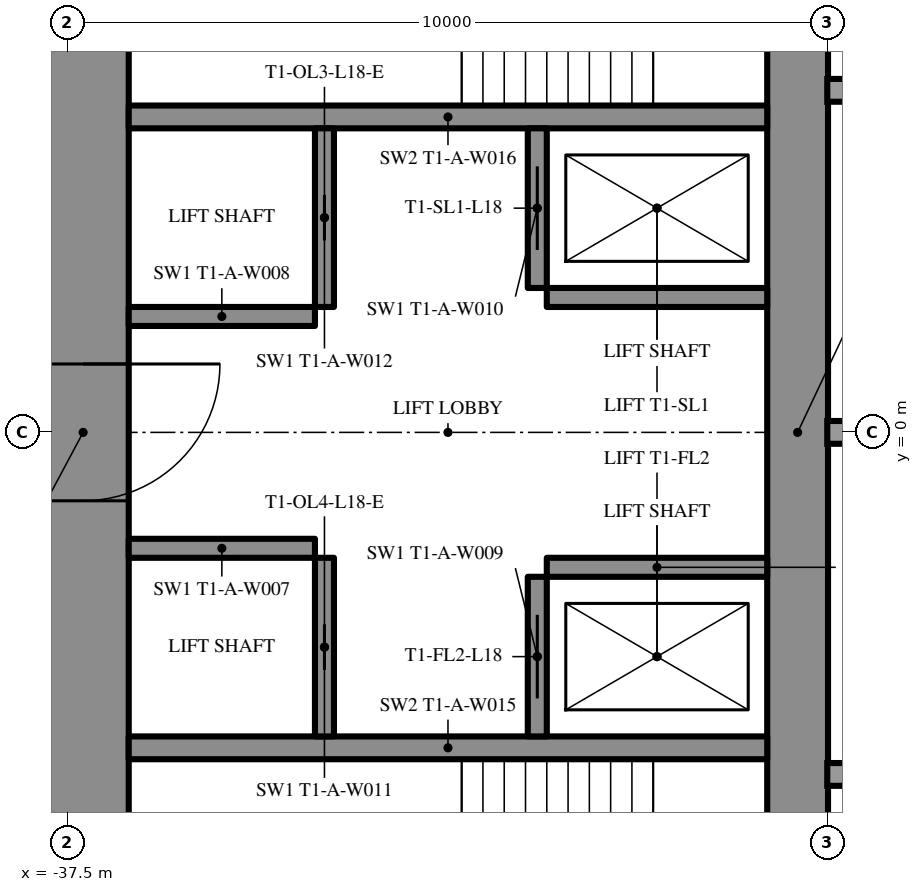
"""IFC4 building model, lengths in metres.
Left out: names, types, materials, properties, quantities, classifications, styles, units other than length and angle.
Written with IfcOpenShell. Run it as: python <this file> out.ifc"""

import sys

from ifc_helpers import new_model, si_unit, direction, frame, frame_2d, origin, place, context, subcontext, project, spatial, rectangle, extrude, element, fill, save


model = new_model("IFC4")
c1 = context("Model", 3, precision=1e-05, world=origin(), true_north=direction((0.0, 1.0)))
c2 = subcontext(c1, "Body", "Model", "MODEL_VIEW")
j1 = project(units=[si_unit("LENGTHUNIT", "METRE"), si_unit("PLANEANGLEUNIT", "RADIAN")], contexts=[c1])
p1 = place(None, origin())
s1 = spatial("IfcSite", under=j1, at=p1, CompositionType="ELEMENT")
p2 = place(p1, origin())
s2 = spatial("IfcBuilding", under=s1, at=p2, CompositionType="ELEMENT")
p3 = place(p2, frame((0.0, 0.0, 70.5)))
s3 = spatial("IfcBuildingStorey", under=s2, at=p3, CompositionType="ELEMENT", Elevation=70.5)
p4 = place(p3, frame((-27.9, 8.6, 0.0), z_axis=(0.0, 0.0, 1.0), x_axis=(0.0, -1.0, 0.0)))
e1 = element("IfcWall", 1, at=p4, inside=s3, PredefinedType="SHEAR", context=c2, shape_type="SweptSolid", body=[
    extrude(rectangle(XDim=17.2, YDim=0.8, at=frame_2d((8.6, 0.0))), origin(), (0.0, 0.0, 1.0), 3.5),
])
p5 = place(p4, frame((2.45, 0.0, 0.6)))
e2 = element("IfcOpeningElement", 2, at=p5, cuts=e1, PredefinedType="OPENING", context=c2, shape_type="SweptSolid", body=[
    extrude(rectangle(XDim=0.6, YDim=2.1, at=frame_2d((0.3, 1.05))), frame((0.0, 0.41, 0.0), z_axis=(0.0, -1.0, 0.0), x_axis=(1.0, 0.0, 0.0)), (0.0, 0.0, 1.0), 0.82),
])
p6 = place(p4, frame((14.15, 0.0, 0.6)))
e3 = element("IfcOpeningElement", 3, at=p6, cuts=e1, PredefinedType="OPENING", context=c2, shape_type="SweptSolid", body=[
    extrude(rectangle(XDim=0.6, YDim=2.1, at=frame_2d((0.3, 1.05))), frame((0.0, 0.41, 0.0), z_axis=(0.0, -1.0, 0.0), x_axis=(1.0, 0.0, 0.0)), (0.0, 0.0, 1.0), 0.82),
])
p7 = place(p3, frame((-37.3, 8.6, 0.0), z_axis=(0.0, 0.0, 1.0), x_axis=(0.0, -1.0, 0.0)))
e4 = element("IfcWall", 4, at=p7, inside=s3, PredefinedType="SHEAR", context=c2, shape_type="SweptSolid", body=[
    extrude(rectangle(XDim=17.2, YDim=1.2, at=frame_2d((8.6, 0.0))), origin(), (0.0, 0.0, 1.0), 3.5),
])
p8 = place(p7, frame((7.7, 0.0, 0.0)))
e5 = element("IfcOpeningElement", 5, at=p8, cuts=e4, PredefinedType="OPENING", context=c2, shape_type="SweptSolid", body=[
    extrude(rectangle(XDim=1.8, YDim=2.2, at=frame_2d((0.9, 1.1))), frame((0.0, 0.61, 0.0), z_axis=(0.0, -1.0, 0.0), x_axis=(1.0, 0.0, 0.0)), (0.0, 0.0, 1.0), 1.22),
])
for number, where, z_axis, x_axis in (
    (6, (-28.3, 4.15, 0.0), (0.0, 0.0, 1.0), (-1.0, 0.0, 0.0)),
    (7, (-28.3, -4.15, 0.0), (0.0, 0.0, 1.0), (-1.0, 0.0, 0.0)),
):
    element("IfcWall", number, at=place(p3, frame(where, z_axis=z_axis, x_axis=x_axis)), inside=s3, PredefinedType="SHEAR", context=c2, shape_type="SweptSolid", body=[
        extrude(rectangle(XDim=8.4, YDim=0.3, at=frame_2d((4.2, 0.0))), origin(), (0.0, 0.0, 1.0), 3.5),
    ])
p9 = place(p3, frame((-31.325, 4.0, 0.0), z_axis=(0.0, 0.0, 1.0), x_axis=(0.0, -1.0, 0.0)))
e8 = element("IfcWall", 8, at=p9, inside=s3, PredefinedType="SHEAR", context=c2, shape_type="SweptSolid", body=[
    extrude(rectangle(XDim=2.1, YDim=0.25, at=frame_2d((1.05, 0.0))), origin(), (0.0, 0.0, 1.0), 3.5),
])
p10 = place(p9, frame((0.5, 0.0, 0.0)))
e9 = element("IfcOpeningElement", 9, at=p10, cuts=e8, PredefinedType="OPENING", context=c2, shape_type="SweptSolid", body=[
    extrude(rectangle(XDim=1.1, YDim=2.2, at=frame_2d((0.55, 1.1))), frame((0.0, 0.135, 0.0), z_axis=(0.0, -1.0, 0.0), x_axis=(1.0, 0.0, 0.0)), (0.0, 0.0, 1.0), 0.27),
])
p11 = place(p3, frame((-34.125, 4.0, 0.0), z_axis=(0.0, 0.0, 1.0), x_axis=(0.0, -1.0, 0.0)))
e10 = element("IfcWall", 10, at=p11, inside=s3, PredefinedType="SHEAR", context=c2, shape_type="SweptSolid", body=[
    extrude(rectangle(XDim=2.35, YDim=0.25, at=frame_2d((1.175, 0.0))), origin(), (0.0, 0.0, 1.0), 3.5),
])
p12 = place(p11, frame((0.875, 0.0, 0.0)))
e11 = element("IfcOpeningElement", 11, at=p12, cuts=e10, PredefinedType="OPENING", context=c2, shape_type="SweptSolid", body=[
    extrude(rectangle(XDim=0.6, YDim=2.0, at=frame_2d((0.3, 1.0))), frame((0.0, 0.135, 0.0), z_axis=(0.0, -1.0, 0.0), x_axis=(1.0, 0.0, 0.0)), (0.0, 0.0, 1.0), 0.27),
])
p13 = place(p3, frame((-28.3, 1.775, 0.0), z_axis=(0.0, 0.0, 1.0), x_axis=(-1.0, 0.0, 0.0)))
e12 = element("IfcWall", 12, at=p13, inside=s3, PredefinedType="SHEAR", context=c2, shape_type="SweptSolid", body=[
    extrude(rectangle(XDim=2.9, YDim=0.25, at=frame_2d((1.45, 0.0))), origin(), (0.0, 0.0, 1.0), 3.5),
])
p14 = place(p3, frame((-34.25, 1.525, 0.0), z_axis=(0.0, 0.0, 1.0), x_axis=(-1.0, 0.0, 0.0)))
e13 = element("IfcWall", 13, at=p14, inside=s3, PredefinedType="SHEAR", context=c2, shape_type="SweptSolid", body=[
    extrude(rectangle(XDim=2.45, YDim=0.25, at=frame_2d((1.225, 0.0))), origin(), (0.0, 0.0, 1.0), 3.5),
])
p15 = place(p3, frame((-31.325, -1.9, 0.0), z_axis=(0.0, 0.0, 1.0), x_axis=(0.0, -1.0, 0.0)))
e14 = element("IfcWall", 14, at=p15, inside=s3, PredefinedType="SHEAR", context=c2, shape_type="SweptSolid", body=[
    extrude(rectangle(XDim=2.1, YDim=0.25, at=frame_2d((1.05, 0.0))), origin(), (0.0, 0.0, 1.0), 3.5),
])
p16 = place(p15, frame((0.5, 0.0, 0.0)))
e15 = element("IfcOpeningElement", 15, at=p16, cuts=e14, PredefinedType="OPENING", context=c2, shape_type="SweptSolid", body=[
    extrude(rectangle(XDim=1.1, YDim=2.2, at=frame_2d((0.55, 1.1))), frame((0.0, 0.135, 0.0), z_axis=(0.0, -1.0, 0.0), x_axis=(1.0, 0.0, 0.0)), (0.0, 0.0, 1.0), 0.27),
])
p17 = place(p3, frame((-34.125, -1.65, 0.0), z_axis=(0.0, 0.0, 1.0), x_axis=(0.0, -1.0, 0.0)))
e16 = element("IfcWall", 16, at=p17, inside=s3, PredefinedType="SHEAR", context=c2, shape_type="SweptSolid", body=[
    extrude(rectangle(XDim=2.35, YDim=0.25, at=frame_2d((1.175, 0.0))), origin(), (0.0, 0.0, 1.0), 3.5),
])
p18 = place(p17, frame((0.875, 0.0, 0.0)))
e17 = element("IfcOpeningElement", 17, at=p18, cuts=e16, PredefinedType="OPENING", context=c2, shape_type="SweptSolid", body=[
    extrude(rectangle(XDim=0.6, YDim=2.0, at=frame_2d((0.3, 1.0))), frame((0.0, 0.135, 0.0), z_axis=(0.0, -1.0, 0.0), x_axis=(1.0, 0.0, 0.0)), (0.0, 0.0, 1.0), 0.27),
])
p19 = place(p3, frame((-28.3, -1.775, 0.0), z_axis=(0.0, 0.0, 1.0), x_axis=(-1.0, 0.0, 0.0)))
e18 = element("IfcWall", 18, at=p19, inside=s3, PredefinedType="SHEAR", context=c2, shape_type="SweptSolid", body=[
    extrude(rectangle(XDim=2.9, YDim=0.25, at=frame_2d((1.45, 0.0))), origin(), (0.0, 0.0, 1.0), 3.5),
])
p20 = place(p3, frame((-34.25, -1.525, 0.0), z_axis=(0.0, 0.0, 1.0), x_axis=(-1.0, 0.0, 0.0)))
e19 = element("IfcWall", 19, at=p20, inside=s3, PredefinedType="SHEAR", context=c2, shape_type="SweptSolid", body=[
    extrude(rectangle(XDim=2.45, YDim=0.25, at=frame_2d((1.225, 0.0))), origin(), (0.0, 0.0, 1.0), 3.5),
])
p21 = place(p3, frame((-27.2, 14.3, 0.0), z_axis=(0.0, 0.0, 1.0), x_axis=(-0.866026593062, -0.499997940104, 0.0)))
e20 = element("IfcWall", 20, at=p21, inside=s3, PredefinedType="SHEAR", context=c2, shape_type="SweptSolid", body=[
    extrude(rectangle(XDim=28.946, YDim=1.2, at=frame_2d((14.473, 0.0))), origin(), (0.0, 0.0, 1.0), 3.5),
])
p22 = place(p21, frame((4.6, 0.0, 0.0)))
e21 = element("IfcOpeningElement", 21, at=p22, cuts=e20, PredefinedType="OPENING", context=c2, shape_type="SweptSolid", body=[
    extrude(rectangle(XDim=1.0, YDim=2.2, at=frame_2d((0.5, 1.1))), frame((0.0, 0.61, 0.0), z_axis=(0.0, -1.0, 0.0), x_axis=(1.0, 0.0, 0.0)), (0.0, 0.0, 1.0), 1.22),
])
p23 = place(p21, frame((13.395, 0.0, 0.0)))
e22 = element("IfcOpeningElement", 22, at=p23, cuts=e20, PredefinedType="OPENING", context=c2, shape_type="SweptSolid", body=[
    extrude(rectangle(XDim=1.8, YDim=2.2, at=frame_2d((0.9, 1.1))), frame((0.0, 0.61, 0.0), z_axis=(0.0, -1.0, 0.0), x_axis=(1.0, 0.0, 0.0)), (0.0, 0.0, 1.0), 1.22),
])
p24 = place(p3, frame((-27.2, -14.3, 0.0), z_axis=(0.0, 0.0, 1.0), x_axis=(-0.866024021859, 0.500002393557, 0.0)))
e23 = element("IfcWall", 23, at=p24, inside=s3, PredefinedType="SHEAR", context=c2, shape_type="SweptSolid", body=[
    extrude(rectangle(XDim=27.907, YDim=1.2, at=frame_2d((13.954, 0.0))), origin(), (0.0, 0.0, 1.0), 3.5),
])
p25 = place(p24, frame((4.6, 0.0, 0.0)))
e24 = element("IfcOpeningElement", 24, at=p25, cuts=e23, PredefinedType="OPENING", context=c2, shape_type="SweptSolid", body=[
    extrude(rectangle(XDim=1.0, YDim=2.2, at=frame_2d((0.5, 1.1))), frame((0.0, 0.61, 0.0), z_axis=(0.0, -1.0, 0.0), x_axis=(1.0, 0.0, 0.0)), (0.0, 0.0, 1.0), 1.22),
])
p26 = place(p24, frame((13.395, 0.0, 0.0)))
e25 = element("IfcOpeningElement", 25, at=p26, cuts=e23, PredefinedType="OPENING", context=c2, shape_type="SweptSolid", body=[
    extrude(rectangle(XDim=1.8, YDim=2.2, at=frame_2d((0.9, 1.1))), frame((0.0, 0.61, 0.0), z_axis=(0.0, -1.0, 0.0), x_axis=(1.0, 0.0, 0.0)), (0.0, 0.0, 1.0), 1.22),
])
p27 = place(p3, frame((-36.92, -11.344, 0.0), z_axis=(0.0, 0.0, 1.0), x_axis=(-0.866028313256, 0.499994960614, 0.0)))
e26 = element("IfcWall", 26, at=p27, inside=s3, PredefinedType="PARTITIONING", context=c2, shape_type="SweptSolid", body=[
    extrude(rectangle(XDim=22.568, YDim=0.2, at=frame_2d((11.284, 0.0))), origin(), (0.0, 0.0, 1.0), 3.25),
])
p28 = place(p27, frame((20.958, 0.0, 0.0)))
e27 = element("IfcOpeningElement", 27, at=p28, cuts=e26, PredefinedType="OPENING", context=c2, shape_type="SweptSolid", body=[
    extrude(rectangle(XDim=0.95, YDim=2.2, at=frame_2d((0.475, 1.1))), frame((0.0, 0.11, 0.0), z_axis=(0.0, -1.0, 0.0), x_axis=(1.0, 0.0, 0.0)), (0.0, 0.0, 1.0), 0.22),
])
p29 = place(p27, frame((12.68, 0.0, 0.0)))
e28 = element("IfcOpeningElement", 28, at=p29, cuts=e26, PredefinedType="OPENING", context=c2, shape_type="SweptSolid", body=[
    extrude(rectangle(XDim=0.95, YDim=2.2, at=frame_2d((0.475, 1.1))), frame((0.0, 0.11, 0.0), z_axis=(0.0, -1.0, 0.0), x_axis=(1.0, 0.0, 0.0)), (0.0, 0.0, 1.0), 0.22),
])
p30 = place(p27, frame((3.35, 0.0, 0.0)))
e29 = element("IfcOpeningElement", 29, at=p30, cuts=e26, PredefinedType="OPENING", context=c2, shape_type="SweptSolid", body=[
    extrude(rectangle(XDim=1.0, YDim=2.2, at=frame_2d((0.5, 1.1))), frame((0.0, 0.11, 0.0), z_axis=(0.0, -1.0, 0.0), x_axis=(1.0, 0.0, 0.0)), (0.0, 0.0, 1.0), 0.22),
])
p31 = place(p8, origin())
e30 = element("IfcDoor", 30, at=p31, inside=s3, OperationType="DOUBLE_DOOR_SINGLE_SWING", PredefinedType="DOOR", context=c2, shape_type="SweptSolid", body=[
    extrude(rectangle(XDim=1.8, YDim=2.2, at=frame_2d((0.9, 1.1))), frame((0.0, 0.025, 0.0), z_axis=(0.0, -1.0, 0.0), x_axis=(1.0, 0.0, 0.0)), (0.0, 0.0, 1.0), 0.05),
])
fill(e5, e30)
p32 = place(p10, origin())
e31 = element("IfcDoor", 31, at=p32, inside=s3, OperationType="SLIDING_TO_LEFT", PredefinedType="USERDEFINED", context=c2, shape_type="SweptSolid", body=[
    extrude(rectangle(XDim=1.1, YDim=2.2, at=frame_2d((0.55, 1.1))), frame((0.0, 0.025, 0.0), z_axis=(0.0, -1.0, 0.0), x_axis=(1.0, 0.0, 0.0)), (0.0, 0.0, 1.0), 0.05),
])
fill(e9, e31)
p33 = place(p16, origin())
e32 = element("IfcDoor", 32, at=p33, inside=s3, OperationType="SLIDING_TO_LEFT", PredefinedType="USERDEFINED", context=c2, shape_type="SweptSolid", body=[
    extrude(rectangle(XDim=1.1, YDim=2.2, at=frame_2d((0.55, 1.1))), frame((0.0, 0.025, 0.0), z_axis=(0.0, -1.0, 0.0), x_axis=(1.0, 0.0, 0.0)), (0.0, 0.0, 1.0), 0.05),
])
fill(e15, e32)
p34 = place(p12, origin())
e33 = element("IfcDoor", 33, at=p34, inside=s3, OperationType="SLIDING_TO_LEFT", PredefinedType="DOOR", context=c2, shape_type="SweptSolid", body=[
    extrude(rectangle(XDim=0.6, YDim=2.0, at=frame_2d((0.3, 1.0))), frame((0.0, 0.025, 0.0), z_axis=(0.0, -1.0, 0.0), x_axis=(1.0, 0.0, 0.0)), (0.0, 0.0, 1.0), 0.05),
])
fill(e11, e33)
p35 = place(p18, origin())
e34 = element("IfcDoor", 34, at=p35, inside=s3, OperationType="SLIDING_TO_LEFT", PredefinedType="DOOR", context=c2, shape_type="SweptSolid", body=[
    extrude(rectangle(XDim=0.6, YDim=2.0, at=frame_2d((0.3, 1.0))), frame((0.0, 0.025, 0.0), z_axis=(0.0, -1.0, 0.0), x_axis=(1.0, 0.0, 0.0)), (0.0, 0.0, 1.0), 0.05),
])
fill(e17, e34)
save(model, sys.argv[1])
